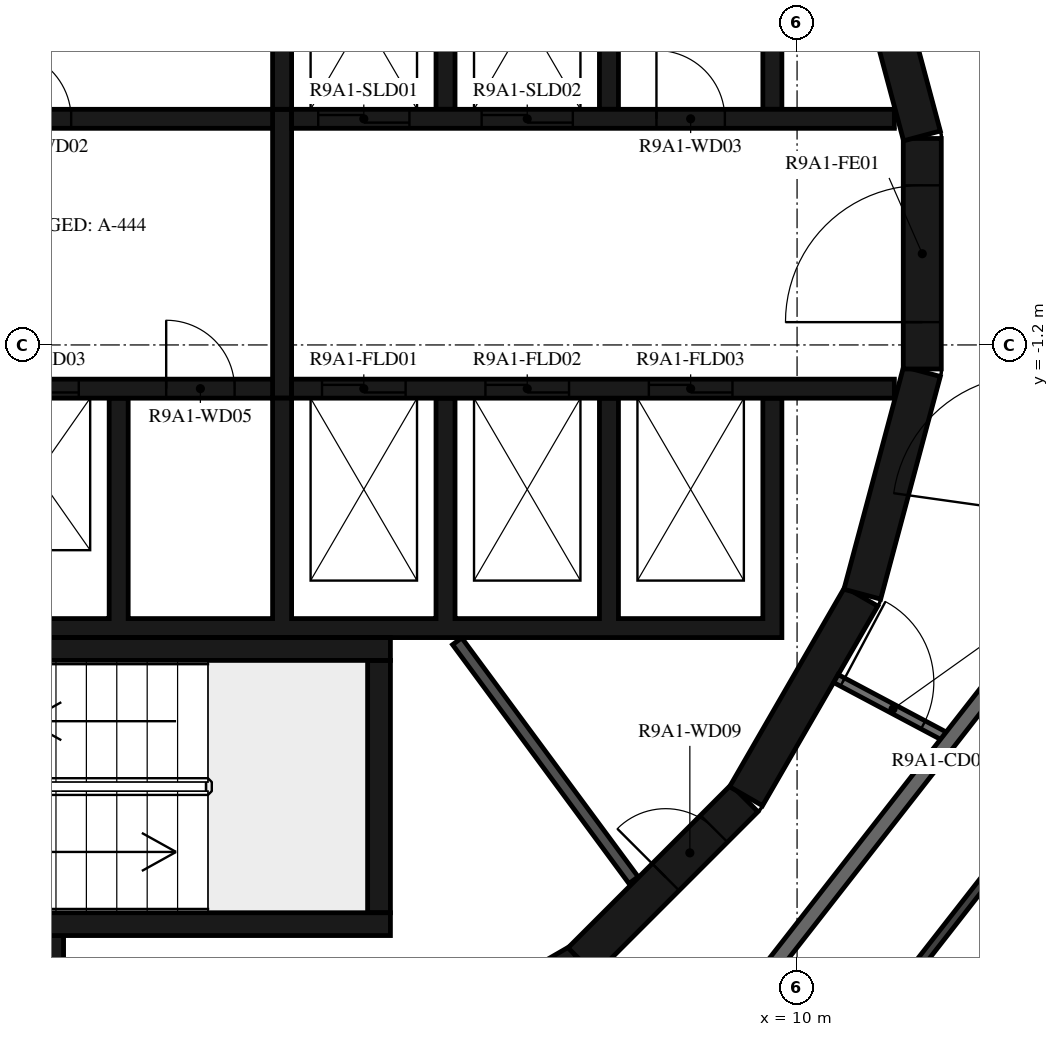
"""IFC4 building model, lengths in metres.
Left out: names, types, materials, properties, quantities, classifications, styles, units other than length and angle.
Written with IfcOpenShell. Run it as: python <this file> out.ifc"""

import sys

from ifc_helpers import new_model, si_unit, direction, frame, frame_2d, origin, place, context, subcontext, project, spatial, polyline, rectangle, outline, extrude, element, fill, save


model = new_model("IFC4")
c1 = context("Model", 3, precision=1e-05, world=origin(), true_north=direction((0.0, 1.0)))
c2 = subcontext(c1, "Body", "Model", "MODEL_VIEW")
j1 = project(units=[si_unit("LENGTHUNIT", "METRE"), si_unit("PLANEANGLEUNIT", "RADIAN")], contexts=[c1])
p1 = place(None, origin())
s1 = spatial("IfcSite", under=j1, at=p1, CompositionType="ELEMENT")
p2 = place(p1, origin())
s2 = spatial("IfcBuilding", under=s1, at=p2, CompositionType="ELEMENT")
p3 = place(p2, frame((0.0, 0.0, 336.5)))
s3 = spatial("IfcBuildingStorey", under=s2, at=p3, CompositionType="ELEMENT", Elevation=336.5)
p4 = place(p3, frame((12.221, -11.578, 0.0), z_axis=(0.0, 0.0, 1.0), x_axis=(0.615666248856, 0.788007024093, 0.0)))
e1 = element("IfcWall", 1, at=p4, inside=s3, PredefinedType="STANDARD", context=c2, shape_type="SweptSolid", body=[
    extrude(rectangle(XDim=3.2, YDim=0.16, at=frame_2d((1.6, 0.0))), origin(), (0.0, 0.0, 1.0), 3.12),
])
p5 = place(p4, frame((0.4, 0.0, 0.0)))
e2 = element("IfcOpeningElement", 2, at=p5, cuts=e1, PredefinedType="OPENING", context=c2, shape_type="SweptSolid", body=[
    extrude(rectangle(XDim=2.4, YDim=2.4, at=frame_2d((1.2, 1.2))), frame((0.0, 0.09, 0.0), z_axis=(0.0, -1.0, 0.0), x_axis=(1.0, 0.0, 0.0)), (0.0, 0.0, 1.0), 0.18),
])
p6 = place(p3, frame((4.51, -10.845, 0.0), z_axis=(0.0, 0.0, 1.0), x_axis=(0.865975092491, 0.500087131594, 0.0)))
e3 = element("IfcWall", 3, at=p6, inside=s3, PredefinedType="SHEAR", context=c2, shape_type="SweptSolid", body=[
    extrude(rectangle(XDim=3.033, YDim=0.5, at=frame_2d((1.516, 0.0))), origin(), (0.0, 0.0, 1.0), 3.12),
])
p7 = place(p6, frame((1.066, 0.0, 0.0)))
e4 = element("IfcOpeningElement", 4, at=p7, cuts=e3, PredefinedType="OPENING", context=c2, shape_type="SweptSolid", body=[
    extrude(rectangle(XDim=0.9, YDim=2.1, at=frame_2d((0.45, 1.05))), frame((0.0, 0.26, 0.0), z_axis=(0.0, -1.0, 0.0), x_axis=(1.0, 0.0, 0.0)), (0.0, 0.0, 1.0), 0.52),
])
p8 = place(p3, frame((7.164, -9.308, 0.0), z_axis=(0.0, 0.0, 1.0), x_axis=(0.707106781187, 0.707106781187, 0.0)))
e5 = element("IfcWall", 5, at=p8, inside=s3, PredefinedType="SHEAR", context=c2, shape_type="SweptSolid", body=[
    extrude(rectangle(XDim=3.032, YDim=0.5, at=frame_2d((1.516, 0.0))), origin(), (0.0, 0.0, 1.0), 3.12),
])
p9 = place(p8, frame((1.566, 0.0, 0.0)))
e6 = element("IfcOpeningElement", 6, at=p9, cuts=e5, PredefinedType="OPENING", context=c2, shape_type="SweptSolid", body=[
    extrude(rectangle(XDim=0.9, YDim=2.1, at=frame_2d((0.45, 1.05))), frame((0.0, 0.26, 0.0), z_axis=(0.0, -1.0, 0.0), x_axis=(1.0, 0.0, 0.0)), (0.0, 0.0, 1.0), 0.52),
])
for number, where, z_axis, x_axis in (
    (7, (9.329, -7.137, 0.0), (0.0, 0.0, 1.0), (0.5, 0.866, 0.0)),
    (8, (10.858, -4.479, 0.0), (0.0, 0.0, 1.0), (0.259, 0.966, 0.0)),
):
    element("IfcWall", number, at=place(p3, frame(where, z_axis=z_axis, x_axis=x_axis)), inside=s3, PredefinedType="SHEAR", context=c2, shape_type="SweptSolid", body=[
        extrude(rectangle(XDim=3.033, YDim=0.5, at=frame_2d((1.516, 0.0))), origin(), (0.0, 0.0, 1.0), 3.12),
    ])
p10 = place(p3, frame((11.647, -1.516, 0.0), z_axis=(0.0, 0.0, 1.0), x_axis=(0.0, 1.0, 0.0)))
e9 = element("IfcWall", 9, at=p10, inside=s3, PredefinedType="SHEAR", context=c2, shape_type="SweptSolid", body=[
    extrude(rectangle(XDim=3.033, YDim=0.5, at=frame_2d((1.516, 0.0))), origin(), (0.0, 0.0, 1.0), 3.12),
])
p11 = place(p10, frame((0.616, 0.0, 0.0)))
e10 = element("IfcOpeningElement", 10, at=p11, cuts=e9, PredefinedType="OPENING", context=c2, shape_type="SweptSolid", body=[
    extrude(rectangle(XDim=1.8, YDim=2.1, at=frame_2d((0.9, 1.05))), frame((0.0, 0.26, 0.0), z_axis=(0.0, -1.0, 0.0), x_axis=(1.0, 0.0, 0.0)), (0.0, 0.0, 1.0), 0.52),
])
p12 = place(p3, frame((11.643, 1.55, 0.0), z_axis=(0.0, 0.0, 1.0), x_axis=(-0.258734743916, 0.965948410781, 0.0)))
e11 = element("IfcWall", 11, at=p12, inside=s3, PredefinedType="SHEAR", context=c2, shape_type="SweptSolid", body=[
    extrude(rectangle(XDim=3.033, YDim=0.5, at=frame_2d((1.516, 0.0))), origin(), (0.0, 0.0, 1.0), 3.12),
])
p13 = place(p3, frame((-2.4, -5.2, 0.0), z_axis=(0.0, 0.0, 1.0), x_axis=(1.0, 0.0, 0.0)))
e12 = element("IfcWall", 12, at=p13, inside=s3, PredefinedType="SHEAR", context=c2, shape_type="SweptSolid", body=[
    extrude(rectangle(XDim=7.05, YDim=0.3, at=frame_2d((3.525, 0.0))), origin(), (0.0, 0.0, 1.0), 3.12),
])
p14 = place(p3, frame((4.5, -8.67, 0.0), z_axis=(0.0, 0.0, 1.0), x_axis=(0.0, 1.0, 0.0)))
e13 = element("IfcWall", 13, at=p14, inside=s3, PredefinedType="SHEAR", context=c2, shape_type="SweptSolid", body=[
    extrude(rectangle(XDim=3.32, YDim=0.3, at=frame_2d((1.66, 0.0))), origin(), (0.0, 0.0, 1.0), 3.12),
])
p15 = place(p3, frame((0.1, -8.82, 0.0), z_axis=(0.0, 0.0, 1.0), x_axis=(1.0, 0.0, 0.0)))
e14 = element("IfcWall", 14, at=p15, inside=s3, PredefinedType="SHEAR", context=c2, shape_type="SweptSolid", body=[
    extrude(rectangle(XDim=4.55, YDim=0.3, at=frame_2d((2.275, 0.0))), origin(), (0.0, 0.0, 1.0), 3.12),
])
p16 = place(p3, frame((0.225, -8.97, 0.0), z_axis=(0.0, 0.0, 1.0), x_axis=(0.0, -1.0, 0.0)))
e15 = element("IfcWall", 15, at=p16, inside=s3, PredefinedType="SHEAR", context=c2, shape_type="SweptSolid", body=[
    extrude(rectangle(XDim=2.41, YDim=0.25, at=frame_2d((1.205, 0.0))), origin(), (0.0, 0.0, 1.0), 3.12),
])
p17 = place(p3, origin())
e16 = element("IfcWall", 16, at=p17, inside=s3, PredefinedType="SHEAR", context=c2, shape_type="SweptSolid", body=[
    extrude(outline(polyline([(-9.8, 1.9), (-9.55, 1.9), (-9.55, 4.8), (-3.35, 4.8), (-3.35, 1.9), (-3.1, 1.9), (-3.1, 4.8), (3.1, 4.8), (3.1, 1.9), (3.35, 1.9), (3.35, 4.8), (5.25, 4.8), (5.25, 1.9), (5.5, 1.9), (5.5, 4.8), (7.4, 4.8), (7.4, 1.9), (7.65, 1.9), (7.65, 4.8), (9.55, 4.8), (9.55, 1.9), (9.8, 1.9), (9.8, 4.8), (9.8, 5.05), (-9.8, 5.05), (-9.8, 4.8), (-9.8, 1.9)])), origin(), (0.0, 0.0, 1.0), 3.12),
])
p18 = place(p3, origin())
e17 = element("IfcWall", 17, at=p18, inside=s3, PredefinedType="SHEAR", context=c2, shape_type="SweptSolid", body=[
    extrude(outline(polyline([(9.8, -5.05), (9.8, -4.8), (9.8, -1.9), (9.55, -1.9), (9.55, -4.8), (7.65, -4.8), (7.65, -1.9), (7.4, -1.9), (7.4, -4.8), (5.5, -4.8), (5.5, -1.9), (5.25, -1.9), (5.25, -4.8), (3.35, -4.8), (3.35, -1.9), (3.1, -1.9), (3.1, -4.8), (1.2, -4.8), (1.2, -1.9), (0.95, -1.9), (0.95, -4.8), (-0.95, -4.8), (-0.95, -1.9), (-1.2, -1.9), (-1.2, -4.8), (-3.1, -4.8), (-3.1, -1.9), (-3.35, -1.9), (-3.35, -4.8), (-5.25, -4.8), (-5.25, -1.9), (-5.5, -1.9), (-5.5, -4.8), (-9.55, -4.8), (-9.55, -1.9), (-9.8, -1.9), (-9.8, -4.8), (-9.8, -5.05), (9.8, -5.05)])), origin(), (0.0, 0.0, 1.0), 3.12),
])
p19 = place(p3, frame((-11.28, 1.775, 0.0), z_axis=(0.0, 0.0, 1.0), x_axis=(1.0, 0.0, 0.0)))
e18 = element("IfcWall", 18, at=p19, inside=s3, PredefinedType="SHEAR", context=c2, shape_type="SweptSolid", body=[
    extrude(rectangle(XDim=14.38, YDim=0.25, at=frame_2d((7.19, 0.0))), origin(), (0.0, 0.0, 1.0), 3.12),
])
p20 = place(p19, frame((4.38, 0.0, 0.0)))
e19 = element("IfcOpeningElement", 19, at=p20, cuts=e18, PredefinedType="OPENING", context=c2, shape_type="SweptSolid", body=[
    extrude(rectangle(XDim=0.9, YDim=2.1, at=frame_2d((0.45, 1.05))), frame((0.0, 0.135, 0.0), z_axis=(0.0, -1.0, 0.0), x_axis=(1.0, 0.0, 0.0)), (0.0, 0.0, 1.0), 0.27),
])
p21 = place(p19, frame((10.83, 0.0, 0.0)))
e20 = element("IfcOpeningElement", 20, at=p21, cuts=e18, PredefinedType="OPENING", context=c2, shape_type="SweptSolid", body=[
    extrude(rectangle(XDim=0.9, YDim=2.1, at=frame_2d((0.45, 1.05))), frame((0.0, 0.135, 0.0), z_axis=(0.0, -1.0, 0.0), x_axis=(1.0, 0.0, 0.0)), (0.0, 0.0, 1.0), 0.27),
])
p22 = place(p3, frame((3.35, 1.775, 0.0), z_axis=(0.0, 0.0, 1.0), x_axis=(1.0, 0.0, 0.0)))
e21 = element("IfcWall", 21, at=p22, inside=s3, PredefinedType="SHEAR", context=c2, shape_type="SweptSolid", body=[
    extrude(rectangle(XDim=7.93, YDim=0.25, at=frame_2d((3.965, 0.0))), origin(), (0.0, 0.0, 1.0), 3.12),
])
p23 = place(p22, frame((0.35, 0.0, 0.0)))
e22 = element("IfcOpeningElement", 22, at=p23, cuts=e21, PredefinedType="OPENING", context=c2, shape_type="SweptSolid", body=[
    extrude(rectangle(XDim=1.2, YDim=2.4, at=frame_2d((0.6, 1.2))), frame((0.0, 0.135, 0.0), z_axis=(0.0, -1.0, 0.0), x_axis=(1.0, 0.0, 0.0)), (0.0, 0.0, 1.0), 0.27),
])
p24 = place(p22, frame((2.5, 0.0, 0.0)))
e23 = element("IfcOpeningElement", 23, at=p24, cuts=e21, PredefinedType="OPENING", context=c2, shape_type="SweptSolid", body=[
    extrude(rectangle(XDim=1.2, YDim=2.4, at=frame_2d((0.6, 1.2))), frame((0.0, 0.135, 0.0), z_axis=(0.0, -1.0, 0.0), x_axis=(1.0, 0.0, 0.0)), (0.0, 0.0, 1.0), 0.27),
])
p25 = place(p22, frame((4.8, 0.0, 0.0)))
e24 = element("IfcOpeningElement", 24, at=p25, cuts=e21, PredefinedType="OPENING", context=c2, shape_type="SweptSolid", body=[
    extrude(rectangle(XDim=0.9, YDim=2.1, at=frame_2d((0.45, 1.05))), frame((0.0, 0.135, 0.0), z_axis=(0.0, -1.0, 0.0), x_axis=(1.0, 0.0, 0.0)), (0.0, 0.0, 1.0), 0.27),
])
p26 = place(p3, frame((-11.28, -1.775, 0.0), z_axis=(0.0, 0.0, 1.0), x_axis=(1.0, 0.0, 0.0)))
e25 = element("IfcWall", 25, at=p26, inside=s3, PredefinedType="SHEAR", context=c2, shape_type="SweptSolid", body=[
    extrude(rectangle(XDim=14.38, YDim=0.25, at=frame_2d((7.19, 0.0))), origin(), (0.0, 0.0, 1.0), 3.12),
])
p27 = place(p26, frame((6.43, 0.0, 0.0)))
e26 = element("IfcOpeningElement", 26, at=p27, cuts=e25, PredefinedType="OPENING", context=c2, shape_type="SweptSolid", body=[
    extrude(rectangle(XDim=1.1, YDim=2.1, at=frame_2d((0.55, 1.05))), frame((0.0, 0.135, 0.0), z_axis=(0.0, -1.0, 0.0), x_axis=(1.0, 0.0, 0.0)), (0.0, 0.0, 1.0), 0.27),
])
p28 = place(p26, frame((8.58, 0.0, 0.0)))
e27 = element("IfcOpeningElement", 27, at=p28, cuts=e25, PredefinedType="OPENING", context=c2, shape_type="SweptSolid", body=[
    extrude(rectangle(XDim=1.1, YDim=2.1, at=frame_2d((0.55, 1.05))), frame((0.0, 0.135, 0.0), z_axis=(0.0, -1.0, 0.0), x_axis=(1.0, 0.0, 0.0)), (0.0, 0.0, 1.0), 0.27),
])
p29 = place(p26, frame((10.73, 0.0, 0.0)))
e28 = element("IfcOpeningElement", 28, at=p29, cuts=e25, PredefinedType="OPENING", context=c2, shape_type="SweptSolid", body=[
    extrude(rectangle(XDim=1.1, YDim=2.1, at=frame_2d((0.55, 1.05))), frame((0.0, 0.135, 0.0), z_axis=(0.0, -1.0, 0.0), x_axis=(1.0, 0.0, 0.0)), (0.0, 0.0, 1.0), 0.27),
])
p30 = place(p26, frame((3.305, 0.0, 0.0)))
e29 = element("IfcOpeningElement", 29, at=p30, cuts=e25, PredefinedType="OPENING", context=c2, shape_type="SweptSolid", body=[
    extrude(rectangle(XDim=0.9, YDim=2.1, at=frame_2d((0.45, 1.05))), frame((0.0, 0.135, 0.0), z_axis=(0.0, -1.0, 0.0), x_axis=(1.0, 0.0, 0.0)), (0.0, 0.0, 1.0), 0.27),
])
p31 = place(p26, frame((12.98, 0.0, 0.0)))
e30 = element("IfcOpeningElement", 30, at=p31, cuts=e25, PredefinedType="OPENING", context=c2, shape_type="SweptSolid", body=[
    extrude(rectangle(XDim=0.9, YDim=2.1, at=frame_2d((0.45, 1.05))), frame((0.0, 0.135, 0.0), z_axis=(0.0, -1.0, 0.0), x_axis=(1.0, 0.0, 0.0)), (0.0, 0.0, 1.0), 0.27),
])
p32 = place(p3, frame((3.35, -1.775, 0.0), z_axis=(0.0, 0.0, 1.0), x_axis=(1.0, 0.0, 0.0)))
e31 = element("IfcWall", 31, at=p32, inside=s3, PredefinedType="SHEAR", context=c2, shape_type="SweptSolid", body=[
    extrude(rectangle(XDim=7.93, YDim=0.25, at=frame_2d((3.965, 0.0))), origin(), (0.0, 0.0, 1.0), 3.12),
])
p33 = place(p32, frame((0.4, 0.0, 0.0)))
e32 = element("IfcOpeningElement", 32, at=p33, cuts=e31, PredefinedType="OPENING", context=c2, shape_type="SweptSolid", body=[
    extrude(rectangle(XDim=1.1, YDim=2.4, at=frame_2d((0.55, 1.2))), frame((0.0, 0.135, 0.0), z_axis=(0.0, -1.0, 0.0), x_axis=(1.0, 0.0, 0.0)), (0.0, 0.0, 1.0), 0.27),
])
p34 = place(p32, frame((2.55, 0.0, 0.0)))
e33 = element("IfcOpeningElement", 33, at=p34, cuts=e31, PredefinedType="OPENING", context=c2, shape_type="SweptSolid", body=[
    extrude(rectangle(XDim=1.1, YDim=2.4, at=frame_2d((0.55, 1.2))), frame((0.0, 0.135, 0.0), z_axis=(0.0, -1.0, 0.0), x_axis=(1.0, 0.0, 0.0)), (0.0, 0.0, 1.0), 0.27),
])
p35 = place(p32, frame((4.7, 0.0, 0.0)))
e34 = element("IfcOpeningElement", 34, at=p35, cuts=e31, PredefinedType="OPENING", context=c2, shape_type="SweptSolid", body=[
    extrude(rectangle(XDim=1.1, YDim=2.4, at=frame_2d((0.55, 1.2))), frame((0.0, 0.135, 0.0), z_axis=(0.0, -1.0, 0.0), x_axis=(1.0, 0.0, 0.0)), (0.0, 0.0, 1.0), 0.27),
])
p36 = place(p3, frame((3.225, -1.9, 0.0), z_axis=(0.0, 0.0, 1.0), x_axis=(0.0, 1.0, 0.0)))
e35 = element("IfcWall", 35, at=p36, inside=s3, PredefinedType="SHEAR", context=c2, shape_type="SweptSolid", body=[
    extrude(rectangle(XDim=3.8, YDim=0.25, at=frame_2d((1.9, 0.0))), origin(), (0.0, 0.0, 1.0), 3.12),
])
p37 = place(p3, frame((5.528, -5.098, 0.0), z_axis=(0.0, 0.0, 1.0), x_axis=(0.594034318069, -0.804439698769, 0.0)))
e36 = element("IfcWall", 36, at=p37, inside=s3, PredefinedType="PARTITIONING", context=c2, shape_type="SweptSolid", body=[
    extrude(rectangle(XDim=3.907, YDim=0.15, at=frame_2d((1.953, 0.0))), origin(), (0.0, 0.0, 1.0), 3.12),
])
p38 = place(p3, frame((10.511, -5.589, 0.0), z_axis=(0.0, 0.0, 1.0), x_axis=(0.882959677414, -0.469448834337, 0.0)))
e37 = element("IfcWall", 37, at=p38, inside=s3, PredefinedType="PARTITIONING", context=c2, shape_type="SweptSolid", body=[
    extrude(rectangle(XDim=1.702, YDim=0.12, at=frame_2d((0.851, 0.0))), origin(), (0.0, 0.0, 1.0), 3.12),
])
p39 = place(p38, frame((0.1, 0.0, 0.0)))
e38 = element("IfcOpeningElement", 38, at=p39, cuts=e37, PredefinedType="OPENING", context=c2, shape_type="SweptSolid", body=[
    extrude(rectangle(XDim=1.2, YDim=2.1, at=frame_2d((0.6, 1.05))), frame((0.0, 0.07, 0.0), z_axis=(0.0, -1.0, 0.0), x_axis=(1.0, 0.0, 0.0)), (0.0, 0.0, 1.0), 0.14),
])
p40 = place(p3, frame((13.769, 1.691, 0.0), z_axis=(0.0, 0.0, 1.0), x_axis=(-0.374618189599, 0.92717916932, 0.0)))
e39 = element("IfcWall", 39, at=p40, inside=s3, PredefinedType="STANDARD", context=c2, shape_type="SweptSolid", body=[
    extrude(rectangle(XDim=7.181, YDim=0.2, at=frame_2d((3.591, 0.0))), origin(), (0.0, 0.0, 1.0), 3.12),
])
p41 = place(p40, frame((2.371, 0.0, 0.0)))
e40 = element("IfcOpeningElement", 40, at=p41, cuts=e39, PredefinedType="OPENING", context=c2, shape_type="SweptSolid", body=[
    extrude(rectangle(XDim=1.0, YDim=2.1, at=frame_2d((0.5, 1.05))), frame((0.0, 0.11, 0.0), z_axis=(0.0, -1.0, 0.0), x_axis=(1.0, 0.0, 0.0)), (0.0, 0.0, 1.0), 0.22),
])
p42 = place(p3, frame((8.349, -11.079, 0.0), z_axis=(0.0, 0.0, 1.0), x_axis=(0.615669112324, 0.78800478687, 0.0)))
e41 = element("IfcWall", 41, at=p42, inside=s3, PredefinedType="STANDARD", context=c2, shape_type="SweptSolid", body=[
    extrude(rectangle(XDim=7.181, YDim=0.2, at=frame_2d((3.591, 0.0))), origin(), (0.0, 0.0, 1.0), 3.12),
])
p43 = place(p3, frame((9.351, -12.233, 0.0), z_axis=(0.0, 0.0, 1.0), x_axis=(0.615678207218, 0.787997680933, 0.0)))
e42 = element("IfcWall", 42, at=p43, inside=s3, PredefinedType="PARTITIONING", context=c2, shape_type="SweptSolid", body=[
    extrude(rectangle(XDim=7.765, YDim=0.12, at=frame_2d((3.883, 0.0))), origin(), (0.0, 0.0, 1.0), 3.12),
])
p44 = place(p43, frame((0.2, 0.0, 0.0)))
e43 = element("IfcOpeningElement", 43, at=p44, cuts=e42, PredefinedType="OPENING", context=c2, shape_type="SweptSolid", body=[
    extrude(rectangle(XDim=0.9, YDim=2.1, at=frame_2d((0.45, 1.05))), frame((0.0, 0.07, 0.0), z_axis=(0.0, -1.0, 0.0), x_axis=(1.0, 0.0, 0.0)), (0.0, 0.0, 1.0), 0.14),
])
p45 = place(p11, origin())
e44 = element("IfcDoor", 44, at=p45, inside=s3, OperationType="DOUBLE_DOOR_SINGLE_SWING", PredefinedType="DOOR", context=c2, shape_type="SweptSolid", body=[
    extrude(rectangle(XDim=1.8, YDim=2.1, at=frame_2d((0.9, 1.05))), frame((0.0, 0.025, 0.0), z_axis=(0.0, -1.0, 0.0), x_axis=(1.0, 0.0, 0.0)), (0.0, 0.0, 1.0), 0.05),
])
fill(e10, e44)
p46 = place(p23, origin())
e45 = element("IfcDoor", 45, at=p46, inside=s3, OperationType="DOUBLE_DOOR_SLIDING", PredefinedType="DOOR", context=c2, shape_type="SweptSolid", body=[
    extrude(rectangle(XDim=1.2, YDim=2.4, at=frame_2d((0.6, 1.2))), frame((0.0, 0.025, 0.0), z_axis=(0.0, -1.0, 0.0), x_axis=(1.0, 0.0, 0.0)), (0.0, 0.0, 1.0), 0.05),
])
fill(e22, e45)
p47 = place(p24, origin())
e46 = element("IfcDoor", 46, at=p47, inside=s3, OperationType="DOUBLE_DOOR_SLIDING", PredefinedType="DOOR", context=c2, shape_type="SweptSolid", body=[
    extrude(rectangle(XDim=1.2, YDim=2.4, at=frame_2d((0.6, 1.2))), frame((0.0, 0.025, 0.0), z_axis=(0.0, -1.0, 0.0), x_axis=(1.0, 0.0, 0.0)), (0.0, 0.0, 1.0), 0.05),
])
fill(e23, e46)
p48 = place(p29, origin())
e47 = element("IfcDoor", 47, at=p48, inside=s3, OperationType="DOUBLE_DOOR_SLIDING", PredefinedType="DOOR", context=c2, shape_type="SweptSolid", body=[
    extrude(rectangle(XDim=1.1, YDim=2.1, at=frame_2d((0.55, 1.05))), frame((0.0, 0.025, 0.0), z_axis=(0.0, -1.0, 0.0), x_axis=(1.0, 0.0, 0.0)), (0.0, 0.0, 1.0), 0.05),
])
fill(e28, e47)
p49 = place(p33, origin())
e48 = element("IfcDoor", 48, at=p49, inside=s3, OperationType="DOUBLE_DOOR_SLIDING", PredefinedType="DOOR", context=c2, shape_type="SweptSolid", body=[
    extrude(rectangle(XDim=1.1, YDim=2.4, at=frame_2d((0.55, 1.2))), frame((0.0, 0.025, 0.0), z_axis=(0.0, -1.0, 0.0), x_axis=(1.0, 0.0, 0.0)), (0.0, 0.0, 1.0), 0.05),
])
fill(e32, e48)
p50 = place(p34, origin())
e49 = element("IfcDoor", 49, at=p50, inside=s3, OperationType="DOUBLE_DOOR_SLIDING", PredefinedType="DOOR", context=c2, shape_type="SweptSolid", body=[
    extrude(rectangle(XDim=1.1, YDim=2.4, at=frame_2d((0.55, 1.2))), frame((0.0, 0.025, 0.0), z_axis=(0.0, -1.0, 0.0), x_axis=(1.0, 0.0, 0.0)), (0.0, 0.0, 1.0), 0.05),
])
fill(e33, e49)
p51 = place(p35, origin())
e50 = element("IfcDoor", 50, at=p51, inside=s3, OperationType="DOUBLE_DOOR_SLIDING", PredefinedType="DOOR", context=c2, shape_type="SweptSolid", body=[
    extrude(rectangle(XDim=1.1, YDim=2.4, at=frame_2d((0.55, 1.2))), frame((0.0, 0.025, 0.0), z_axis=(0.0, -1.0, 0.0), x_axis=(1.0, 0.0, 0.0)), (0.0, 0.0, 1.0), 0.05),
])
fill(e34, e50)
p52 = place(p21, origin())
e51 = element("IfcDoor", 51, at=p52, inside=s3, OperationType="SINGLE_SWING_RIGHT", PredefinedType="DOOR", context=c2, shape_type="SweptSolid", body=[
    extrude(rectangle(XDim=0.9, YDim=2.1, at=frame_2d((0.45, 1.05))), frame((0.0, 0.025, 0.0), z_axis=(0.0, -1.0, 0.0), x_axis=(1.0, 0.0, 0.0)), (0.0, 0.0, 1.0), 0.05),
])
fill(e20, e51)
p53 = place(p25, origin())
e52 = element("IfcDoor", 52, at=p53, inside=s3, OperationType="SINGLE_SWING_LEFT", PredefinedType="DOOR", context=c2, shape_type="SweptSolid", body=[
    extrude(rectangle(XDim=0.9, YDim=2.1, at=frame_2d((0.45, 1.05))), frame((0.0, 0.025, 0.0), z_axis=(0.0, -1.0, 0.0), x_axis=(1.0, 0.0, 0.0)), (0.0, 0.0, 1.0), 0.05),
])
fill(e24, e52)
p54 = place(p31, origin())
e53 = element("IfcDoor", 53, at=p54, inside=s3, OperationType="SINGLE_SWING_LEFT", PredefinedType="DOOR", context=c2, shape_type="SweptSolid", body=[
    extrude(rectangle(XDim=0.9, YDim=2.1, at=frame_2d((0.45, 1.05))), frame((0.0, 0.025, 0.0), z_axis=(0.0, -1.0, 0.0), x_axis=(1.0, 0.0, 0.0)), (0.0, 0.0, 1.0), 0.05),
])
fill(e30, e53)
p55 = place(p9, origin())
e54 = element("IfcDoor", 54, at=p55, inside=s3, OperationType="SINGLE_SWING_LEFT", PredefinedType="DOOR", context=c2, shape_type="SweptSolid", body=[
    extrude(rectangle(XDim=0.9, YDim=2.1, at=frame_2d((0.45, 1.05))), frame((0.0, 0.025, 0.0), z_axis=(0.0, -1.0, 0.0), x_axis=(1.0, 0.0, 0.0)), (0.0, 0.0, 1.0), 0.05),
])
fill(e6, e54)
p56 = place(p39, origin())
e55 = element("IfcDoor", 55, at=p56, inside=s3, OperationType="DOUBLE_DOOR_SINGLE_SWING", PredefinedType="DOOR", context=c2, shape_type="SweptSolid", body=[
    extrude(rectangle(XDim=1.2, YDim=2.1, at=frame_2d((0.6, 1.05))), frame((0.0, 0.025, 0.0), z_axis=(0.0, -1.0, 0.0), x_axis=(1.0, 0.0, 0.0)), (0.0, 0.0, 1.0), 0.05),
])
fill(e38, e55)
save(model, sys.argv[1])
